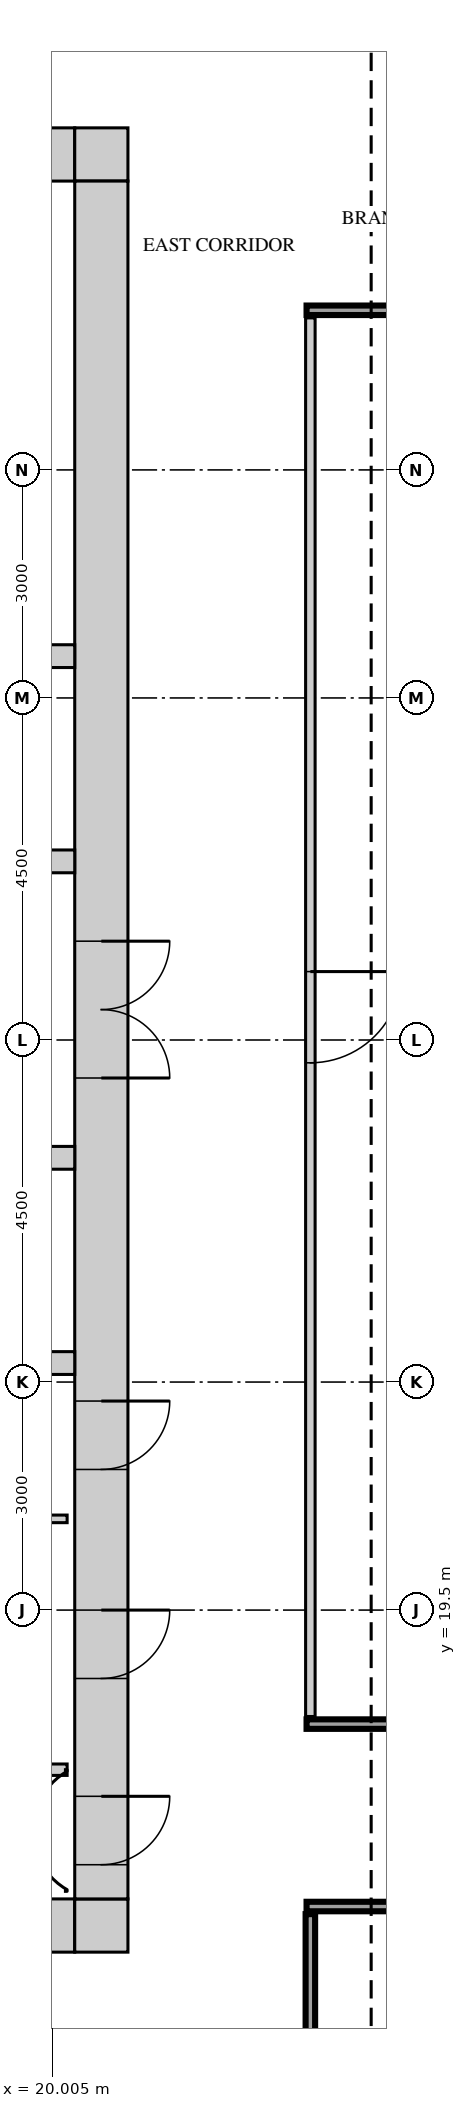
"""IFC4 building model, lengths in metres.
Left out: names, types, materials, properties, quantities, classifications, styles, units other than length and angle.
Written with IfcOpenShell. Run it as: python <this file> out.ifc"""

import sys

from ifc_helpers import new_model, si_unit, direction, frame, frame_2d, origin, place, context, subcontext, project, spatial, rectangle, extrude, source, transform, mapped, element, fill, save


model = new_model("IFC4")
c1 = context("Model", 3, precision=1e-05, world=origin(), true_north=direction((0.0, 1.0)))
c2 = subcontext(c1, "Body", "Model", "MODEL_VIEW")
j1 = project(units=[si_unit("LENGTHUNIT", "METRE"), si_unit("PLANEANGLEUNIT", "RADIAN")], contexts=[c1])
p1 = place(None, origin())
s1 = spatial("IfcSite", under=j1, at=p1, CompositionType="ELEMENT")
p2 = place(p1, origin())
s2 = spatial("IfcBuilding", under=s1, at=p2, CompositionType="ELEMENT")
p3 = place(p2, frame((0.0, 0.0, 226.2)))
s3 = spatial("IfcBuildingStorey", under=s2, at=p3, CompositionType="ELEMENT", Elevation=226.2)
m1 = source(origin(), c2, "Body", "SweptSolid", [
    extrude(rectangle(XDim=13.6, YDim=0.7, at=frame_2d((6.8, 0.0))), origin(), (0.0, 0.0, 1.0), 3.75),
])
p4 = place(p3, frame((6.7, 38.65, 0.0), z_axis=(0.0, 0.0, 1.0), x_axis=(1.0, 0.0, 0.0)))
e1 = element("IfcWall", 1, at=p4, inside=s3, PredefinedType="SHEAR", context=c2, shape_type="MappedRepresentation", body=[
    mapped(m1, transform((0.0, 0.0, 0.0))),
])
m2 = source(origin(), c2, "Body", "SweptSolid", [
    extrude(rectangle(XDim=0.9, YDim=2.1, at=frame_2d((0.45, 1.05))), frame((0.0, 0.36, 0.0), z_axis=(0.0, -1.0, 0.0), x_axis=(1.0, 0.0, 0.0)), (0.0, 0.0, 1.0), 0.72),
])
p5 = place(p4, frame((3.0, 0.0, 0.0)))
e2 = element("IfcOpeningElement", 2, at=p5, cuts=e1, PredefinedType="OPENING", context=c2, shape_type="MappedRepresentation", body=[
    mapped(m2, transform((0.0, 0.0, 0.0))),
])
p6 = place(p4, frame((9.7, 0.0, 0.0)))
e3 = element("IfcOpeningElement", 3, at=p6, cuts=e1, PredefinedType="OPENING", context=c2, shape_type="MappedRepresentation", body=[
    mapped(m2, transform((0.0, 0.0, 0.0))),
])
m3 = source(origin(), c2, "Body", "SweptSolid", [
    extrude(rectangle(XDim=0.7, YDim=0.7, at=frame_2d((0.35, 0.0))), origin(), (0.0, 0.0, 1.0), 3.75),
])
p7 = place(p3, frame((20.3, 38.65, 0.0), z_axis=(0.0, 0.0, 1.0), x_axis=(1.0, 0.0, 0.0)))
e4 = element("IfcWall", 4, at=p7, inside=s3, PredefinedType="SHEAR", context=c2, shape_type="MappedRepresentation", body=[
    mapped(m3, transform((0.0, 0.0, 0.0))),
])
p8 = place(p3, frame((6.7, 15.35, 0.0), z_axis=(0.0, 0.0, 1.0), x_axis=(1.0, 0.0, 0.0)))
e5 = element("IfcWall", 5, at=p8, inside=s3, PredefinedType="SHEAR", context=c2, shape_type="MappedRepresentation", body=[
    mapped(m1, transform((0.0, 0.0, 0.0))),
])
m4 = source(origin(), c2, "Body", "SweptSolid", [
    extrude(rectangle(XDim=1.2, YDim=2.1, at=frame_2d((0.6, 1.05))), frame((0.0, 0.36, 0.0), z_axis=(0.0, -1.0, 0.0), x_axis=(1.0, 0.0, 0.0)), (0.0, 0.0, 1.0), 0.72),
])
p9 = place(p8, frame((5.5, 0.0, 0.0)))
e6 = element("IfcOpeningElement", 6, at=p9, cuts=e5, PredefinedType="OPENING", context=c2, shape_type="MappedRepresentation", body=[
    mapped(m4, transform((0.0, 0.0, 0.0))),
])
p10 = place(p8, frame((2.15, 0.0, 0.0)))
e7 = element("IfcOpeningElement", 7, at=p10, cuts=e5, PredefinedType="OPENING", context=c2, shape_type="MappedRepresentation", body=[
    mapped(m4, transform((0.0, 0.0, 0.0))),
])
m5 = source(origin(), c2, "Body", "SweptSolid", [
    extrude(rectangle(XDim=1.0, YDim=2.1, at=frame_2d((0.5, 1.05))), frame((0.0, 0.36, 0.0), z_axis=(0.0, -1.0, 0.0), x_axis=(1.0, 0.0, 0.0)), (0.0, 0.0, 1.0), 0.72),
])
p11 = place(p8, frame((8.0, 0.0, 0.0)))
e8 = element("IfcOpeningElement", 8, at=p11, cuts=e5, PredefinedType="OPENING", context=c2, shape_type="MappedRepresentation", body=[
    mapped(m5, transform((0.0, 0.0, 0.0))),
])
p12 = place(p3, frame((20.3, 15.35, 0.0), z_axis=(0.0, 0.0, 1.0), x_axis=(1.0, 0.0, 0.0)))
e9 = element("IfcWall", 9, at=p12, inside=s3, PredefinedType="SHEAR", context=c2, shape_type="MappedRepresentation", body=[
    mapped(m3, transform((0.0, 0.0, 0.0))),
])
m6 = source(origin(), c2, "Body", "SweptSolid", [
    extrude(rectangle(XDim=22.6, YDim=0.7, at=frame_2d((11.3, 0.0))), origin(), (0.0, 0.0, 1.0), 3.75),
])
p13 = place(p3, frame((20.65, 15.7, 0.0), z_axis=(0.0, 0.0, 1.0), x_axis=(0.0, 1.0, 0.0)))
e10 = element("IfcWall", 10, at=p13, inside=s3, PredefinedType="SHEAR", context=c2, shape_type="MappedRepresentation", body=[
    mapped(m6, transform((0.0, 0.0, 0.0))),
])
m7 = source(origin(), c2, "Body", "SweptSolid", [
    extrude(rectangle(XDim=1.8, YDim=2.1, at=frame_2d((0.9, 1.05))), frame((0.0, 0.36, 0.0), z_axis=(0.0, -1.0, 0.0), x_axis=(1.0, 0.0, 0.0)), (0.0, 0.0, 1.0), 0.72),
])
p14 = place(p13, frame((10.8, 0.0, 0.0)))
e11 = element("IfcOpeningElement", 11, at=p14, cuts=e10, PredefinedType="OPENING", context=c2, shape_type="MappedRepresentation", body=[
    mapped(m7, transform((0.0, 0.0, 0.0))),
])
p15 = place(p13, frame((0.45, 0.0, 0.0)))
e12 = element("IfcOpeningElement", 12, at=p15, cuts=e10, PredefinedType="OPENING", context=c2, shape_type="MappedRepresentation", body=[
    mapped(m2, transform((0.0, 0.0, 0.0))),
])
p16 = place(p13, frame((2.9, 0.0, 0.0)))
e13 = element("IfcOpeningElement", 13, at=p16, cuts=e10, PredefinedType="OPENING", context=c2, shape_type="MappedRepresentation", body=[
    mapped(m2, transform((0.0, 0.0, 0.0))),
])
p17 = place(p13, frame((5.65, 0.0, 0.0)))
e14 = element("IfcOpeningElement", 14, at=p17, cuts=e10, PredefinedType="OPENING", context=c2, shape_type="MappedRepresentation", body=[
    mapped(m2, transform((0.0, 0.0, 0.0))),
])
m8 = source(origin(), c2, "Body", "SweptSolid", [
    extrude(rectangle(XDim=13.6, YDim=0.3, at=frame_2d((6.8, 0.0))), origin(), (0.0, 0.0, 1.0), 3.75),
])
for number, where, z_axis, x_axis in (
    (15, (6.7, 22.75, 0.0), (0.0, 0.0, 1.0), (1.0, 0.0, 0.0)),
    (16, (6.7, 32.05, 0.0), (0.0, 0.0, 1.0), (1.0, 0.0, 0.0)),
):
    element("IfcWall", number, at=place(p3, frame(where, z_axis=z_axis, x_axis=x_axis)), inside=s3, PredefinedType="STANDARD", context=c2, shape_type="MappedRepresentation", body=[
        mapped(m8, transform((0.0, 0.0, 0.0))),
    ])
p18 = place(p3, frame((6.7, 29.35, 0.0), z_axis=(0.0, 0.0, 1.0), x_axis=(1.0, 0.0, 0.0)))
e17 = element("IfcWall", 17, at=p18, inside=s3, PredefinedType="STANDARD", context=c2, shape_type="MappedRepresentation", body=[
    mapped(m8, transform((0.0, 0.0, 0.0))),
])
m9 = source(origin(), c2, "Body", "SweptSolid", [
    extrude(rectangle(XDim=1.2, YDim=2.1, at=frame_2d((0.6, 1.05))), frame((0.0, 0.16, 0.0), z_axis=(0.0, -1.0, 0.0), x_axis=(1.0, 0.0, 0.0)), (0.0, 0.0, 1.0), 0.32),
])
p19 = place(p18, frame((1.05, 0.0, 0.0)))
e18 = element("IfcOpeningElement", 18, at=p19, cuts=e17, PredefinedType="OPENING", context=c2, shape_type="MappedRepresentation", body=[
    mapped(m9, transform((0.0, 0.0, 0.0))),
])
p20 = place(p18, frame((3.6, 0.0, 0.0)))
e19 = element("IfcOpeningElement", 19, at=p20, cuts=e17, PredefinedType="OPENING", context=c2, shape_type="MappedRepresentation", body=[
    mapped(m9, transform((0.0, 0.0, 0.0))),
])
p21 = place(p18, frame((6.15, 0.0, 0.0)))
e20 = element("IfcOpeningElement", 20, at=p21, cuts=e17, PredefinedType="OPENING", context=c2, shape_type="MappedRepresentation", body=[
    mapped(m9, transform((0.0, 0.0, 0.0))),
])
p22 = place(p18, frame((8.7, 0.0, 0.0)))
e21 = element("IfcOpeningElement", 21, at=p22, cuts=e17, PredefinedType="OPENING", context=c2, shape_type="MappedRepresentation", body=[
    mapped(m9, transform((0.0, 0.0, 0.0))),
])
p23 = place(p18, frame((11.25, 0.0, 0.0)))
e22 = element("IfcOpeningElement", 22, at=p23, cuts=e17, PredefinedType="OPENING", context=c2, shape_type="MappedRepresentation", body=[
    mapped(m9, transform((0.0, 0.0, 0.0))),
])
p24 = place(p3, frame((6.7, 25.45, 0.0), z_axis=(0.0, 0.0, 1.0), x_axis=(1.0, 0.0, 0.0)))
e23 = element("IfcWall", 23, at=p24, inside=s3, PredefinedType="STANDARD", context=c2, shape_type="MappedRepresentation", body=[
    mapped(m8, transform((0.0, 0.0, 0.0))),
])
p25 = place(p24, frame((1.05, 0.0, 0.0)))
e24 = element("IfcOpeningElement", 24, at=p25, cuts=e23, PredefinedType="OPENING", context=c2, shape_type="MappedRepresentation", body=[
    mapped(m9, transform((0.0, 0.0, 0.0))),
])
p26 = place(p24, frame((3.6, 0.0, 0.0)))
e25 = element("IfcOpeningElement", 25, at=p26, cuts=e23, PredefinedType="OPENING", context=c2, shape_type="MappedRepresentation", body=[
    mapped(m9, transform((0.0, 0.0, 0.0))),
])
p27 = place(p24, frame((6.15, 0.0, 0.0)))
e26 = element("IfcOpeningElement", 26, at=p27, cuts=e23, PredefinedType="OPENING", context=c2, shape_type="MappedRepresentation", body=[
    mapped(m9, transform((0.0, 0.0, 0.0))),
])
p28 = place(p24, frame((8.7, 0.0, 0.0)))
e27 = element("IfcOpeningElement", 27, at=p28, cuts=e23, PredefinedType="OPENING", context=c2, shape_type="MappedRepresentation", body=[
    mapped(m9, transform((0.0, 0.0, 0.0))),
])
p29 = place(p24, frame((11.25, 0.0, 0.0)))
e28 = element("IfcOpeningElement", 28, at=p29, cuts=e23, PredefinedType="OPENING", context=c2, shape_type="MappedRepresentation", body=[
    mapped(m9, transform((0.0, 0.0, 0.0))),
])
m10 = source(origin(), c2, "Body", "SweptSolid", [
    extrude(rectangle(XDim=10.85, YDim=0.125, at=frame_2d((5.425, 0.0))), origin(), (0.0, 0.0, 1.0), 3.8),
])
p30 = place(p3, frame((23.4, 4.65, 0.0), z_axis=(0.0, 0.0, 1.0), x_axis=(0.0, 1.0, 0.0)))
e29 = element("IfcWall", 29, at=p30, inside=s3, PredefinedType="PARTITIONING", context=c2, shape_type="MappedRepresentation", body=[
    mapped(m10, transform((0.0, 0.0, 0.0))),
])
m11 = source(origin(), c2, "Body", "SweptSolid", [
    extrude(rectangle(XDim=0.9, YDim=2.1, at=frame_2d((0.45, 1.05))), frame((0.0, 0.073, 0.0), z_axis=(0.0, -1.0, 0.0), x_axis=(1.0, 0.0, 0.0)), (0.0, 0.0, 1.0), 0.145),
])
p31 = place(p30, frame((4.5, 0.0, 0.0)))
e30 = element("IfcOpeningElement", 30, at=p31, cuts=e29, PredefinedType="OPENING", context=c2, shape_type="MappedRepresentation", body=[
    mapped(m11, transform((0.0, 0.0, 0.0))),
])
m12 = source(origin(), c2, "Body", "SweptSolid", [
    extrude(rectangle(XDim=26.0, YDim=0.125, at=frame_2d((13.0, 0.0))), origin(), (0.0, 0.0, 1.0), 3.8),
])
p32 = place(p3, frame((23.35, 15.6, 0.0), z_axis=(0.0, 0.0, 1.0), x_axis=(1.0, 0.0, 0.0)))
e31 = element("IfcWall", 31, at=p32, inside=s3, PredefinedType="PARTITIONING", context=c2, shape_type="MappedRepresentation", body=[
    mapped(m12, transform((0.0, 0.0, 0.0))),
])
p33 = place(p32, frame((4.05, 0.0, 0.0)))
e32 = element("IfcOpeningElement", 32, at=p33, cuts=e31, PredefinedType="OPENING", context=c2, shape_type="MappedRepresentation", body=[
    mapped(m11, transform((0.0, 0.0, 0.0))),
])
m13 = source(origin(), c2, "Body", "SweptSolid", [
    extrude(rectangle(XDim=1.0, YDim=2.1, at=frame_2d((0.5, 1.05))), frame((0.0, 0.073, 0.0), z_axis=(0.0, -1.0, 0.0), x_axis=(1.0, 0.0, 0.0)), (0.0, 0.0, 1.0), 0.145),
])
p34 = place(p32, frame((6.85, 0.0, 0.0)))
e33 = element("IfcOpeningElement", 33, at=p34, cuts=e31, PredefinedType="OPENING", context=c2, shape_type="MappedRepresentation", body=[
    mapped(m13, transform((0.0, 0.0, 0.0))),
])
p35 = place(p32, frame((9.25, 0.0, 0.0)))
e34 = element("IfcOpeningElement", 34, at=p35, cuts=e31, PredefinedType="OPENING", context=c2, shape_type="MappedRepresentation", body=[
    mapped(m11, transform((0.0, 0.0, 0.0))),
])
p36 = place(p32, frame((15.1, 0.0, 0.0)))
e35 = element("IfcOpeningElement", 35, at=p36, cuts=e31, PredefinedType="OPENING", context=c2, shape_type="MappedRepresentation", body=[
    mapped(m11, transform((0.0, 0.0, 0.0))),
])
p37 = place(p32, frame((22.6, 0.0, 0.0)))
e36 = element("IfcOpeningElement", 36, at=p37, cuts=e31, PredefinedType="OPENING", context=c2, shape_type="MappedRepresentation", body=[
    mapped(m11, transform((0.0, 0.0, 0.0))),
])
m14 = source(origin(), c2, "Body", "SweptSolid", [
    extrude(rectangle(XDim=4.0, YDim=0.15, at=frame_2d((2.0, 0.0))), origin(), (0.0, 0.0, 1.0), 3.8),
])
p38 = place(p3, frame((16.2, 17.4, 0.0), z_axis=(0.0, 0.0, 1.0), x_axis=(1.0, 0.0, 0.0)))
e37 = element("IfcWall", 37, at=p38, inside=s3, PredefinedType="PARTITIONING", context=c2, shape_type="MappedRepresentation", body=[
    mapped(m14, transform((0.0, 0.0, 0.0))),
])
p39 = place(p3, frame((23.35, 18.0, 0.0), z_axis=(0.0, 0.0, 1.0), x_axis=(1.0, 0.0, 0.0)))
e38 = element("IfcWall", 38, at=p39, inside=s3, PredefinedType="PARTITIONING", context=c2, shape_type="MappedRepresentation", body=[
    mapped(m12, transform((0.0, 0.0, 0.0))),
])
m15 = source(origin(), c2, "Body", "SweptSolid", [
    extrude(rectangle(XDim=1.2, YDim=2.1, at=frame_2d((0.6, 1.05))), frame((0.0, 0.073, 0.0), z_axis=(0.0, -1.0, 0.0), x_axis=(1.0, 0.0, 0.0)), (0.0, 0.0, 1.0), 0.145),
])
p40 = place(p39, frame((11.55, 0.0, 0.0)))
e39 = element("IfcOpeningElement", 39, at=p40, cuts=e38, PredefinedType="OPENING", context=c2, shape_type="MappedRepresentation", body=[
    mapped(m15, transform((0.0, 0.0, 0.0))),
])
p41 = place(p39, frame((21.3, 0.0, 0.0)))
e40 = element("IfcOpeningElement", 40, at=p41, cuts=e38, PredefinedType="OPENING", context=c2, shape_type="MappedRepresentation", body=[
    mapped(m15, transform((0.0, 0.0, 0.0))),
])
m16 = source(origin(), c2, "Body", "SweptSolid", [
    extrude(rectangle(XDim=18.4, YDim=0.125, at=frame_2d((9.2, 0.0))), origin(), (0.0, 0.0, 1.0), 3.8),
])
p42 = place(p3, frame((23.4, 18.1, 0.0), z_axis=(0.0, 0.0, 1.0), x_axis=(0.0, 1.0, 0.0)))
e41 = element("IfcWall", 41, at=p42, inside=s3, PredefinedType="PARTITIONING", context=c2, shape_type="MappedRepresentation", body=[
    mapped(m16, transform((0.0, 0.0, 0.0))),
])
p43 = place(p42, frame((8.6, 0.0, 0.0)))
e42 = element("IfcOpeningElement", 42, at=p43, cuts=e41, PredefinedType="OPENING", context=c2, shape_type="MappedRepresentation", body=[
    mapped(m15, transform((0.0, 0.0, 0.0))),
])
m17 = source(origin(), c2, "Body", "SweptSolid", [
    extrude(rectangle(XDim=4.1, YDim=0.1, at=frame_2d((2.05, 0.0))), origin(), (0.0, 0.0, 1.0), 3.8),
])
p44 = place(p3, frame((16.1, 20.7, 0.0), z_axis=(0.0, 0.0, 1.0), x_axis=(1.0, 0.0, 0.0)))
e43 = element("IfcWall", 43, at=p44, inside=s3, PredefinedType="PARTITIONING", context=c2, shape_type="MappedRepresentation", body=[
    mapped(m17, transform((0.0, 0.0, 0.0))),
])
p45 = place(p3, frame((23.35, 36.6, 0.0), z_axis=(0.0, 0.0, 1.0), x_axis=(1.0, 0.0, 0.0)))
e44 = element("IfcWall", 44, at=p45, inside=s3, PredefinedType="PARTITIONING", context=c2, shape_type="MappedRepresentation", body=[
    mapped(m12, transform((0.0, 0.0, 0.0))),
])
m18 = source(origin(), c2, "Body", "SweptSolid", [
    extrude(rectangle(XDim=1.8, YDim=2.1, at=frame_2d((0.9, 1.05))), frame((0.0, 0.3, 0.0), z_axis=(0.0, -1.0, 0.0), x_axis=(1.0, 0.0, 0.0)), (0.0, 0.0, 1.0), 0.6),
])
p46 = place(p14, origin())
e45 = element("IfcDoor", 45, at=p46, inside=s3, OperationType="DOUBLE_DOOR_SINGLE_SWING", PredefinedType="DOOR", context=c2, shape_type="MappedRepresentation", body=[
    mapped(m18, transform((0.0, 0.0, 0.0))),
])
fill(e11, e45)
m19 = source(origin(), c2, "Body", "SweptSolid", [
    extrude(rectangle(XDim=0.9, YDim=2.1, at=frame_2d((0.45, 1.05))), frame((0.0, 0.3, 0.0), z_axis=(0.0, -1.0, 0.0), x_axis=(1.0, 0.0, 0.0)), (0.0, 0.0, 1.0), 0.6),
])
p47 = place(p15, origin())
e46 = element("IfcDoor", 46, at=p47, inside=s3, OperationType="SINGLE_SWING_RIGHT", PredefinedType="DOOR", context=c2, shape_type="MappedRepresentation", body=[
    mapped(m19, transform((0.0, 0.0, 0.0))),
])
fill(e12, e46)
p48 = place(p16, origin())
e47 = element("IfcDoor", 47, at=p48, inside=s3, OperationType="SINGLE_SWING_RIGHT", PredefinedType="DOOR", context=c2, shape_type="MappedRepresentation", body=[
    mapped(m19, transform((0.0, 0.0, 0.0))),
])
fill(e13, e47)
p49 = place(p17, origin())
e48 = element("IfcDoor", 48, at=p49, inside=s3, OperationType="SINGLE_SWING_RIGHT", PredefinedType="DOOR", context=c2, shape_type="MappedRepresentation", body=[
    mapped(m19, transform((0.0, 0.0, 0.0))),
])
fill(e14, e48)
m20 = source(origin(), c2, "Body", "SweptSolid", [
    extrude(rectangle(XDim=1.2, YDim=2.1, at=frame_2d((0.6, 1.05))), frame((0.0, 0.025, 0.0), z_axis=(0.0, -1.0, 0.0), x_axis=(1.0, 0.0, 0.0)), (0.0, 0.0, 1.0), 0.05),
])
p50 = place(p43, origin())
e49 = element("IfcDoor", 49, at=p50, inside=s3, OperationType="SINGLE_SWING_RIGHT", PredefinedType="DOOR", context=c2, shape_type="MappedRepresentation", body=[
    mapped(m20, transform((0.0, 0.0, 0.0))),
])
fill(e42, e49)
save(model, sys.argv[1])
